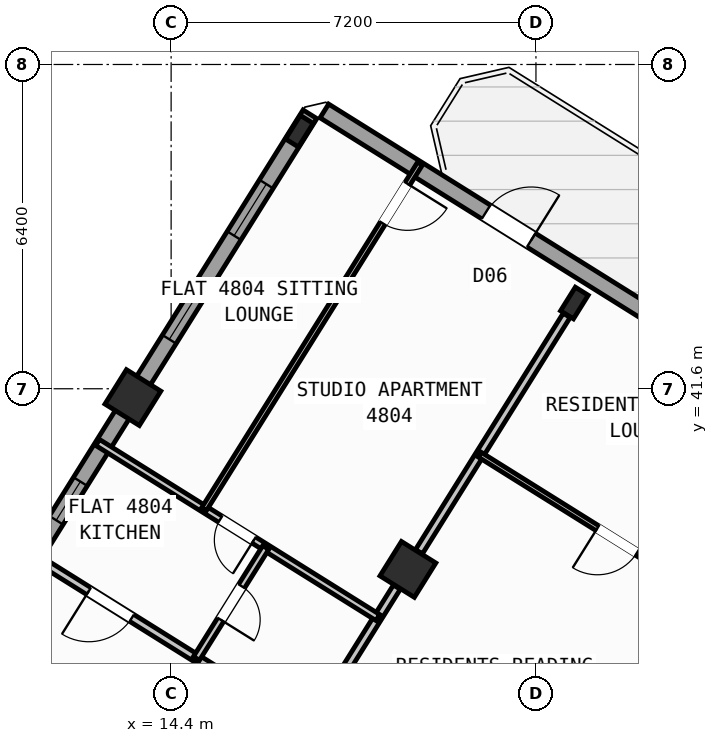
"""IFC4 building model, lengths in metres.
Left out: names, types, materials, properties, quantities, classifications, styles, units other than length and angle.
Written with IfcOpenShell. Run it as: python <this file> out.ifc"""

import sys

from ifc_helpers import new_model, si_unit, direction, frame, frame_2d, origin, origin_2d, place, context, subcontext, project, spatial, rectangle, hollow_rectangle, i_section, extrude, source, transform, mapped, element, fill, save


model = new_model("IFC4")
c1 = context("Model", 3, precision=1e-05, world=origin(), true_north=direction((0.0, 1.0)))
c2 = subcontext(c1, "Body", "Model", "MODEL_VIEW")
j1 = project(units=[si_unit("LENGTHUNIT", "METRE"), si_unit("PLANEANGLEUNIT", "RADIAN")], contexts=[c1])
p1 = place(None, origin())
s1 = spatial("IfcSite", under=j1, at=p1, CompositionType="ELEMENT")
p2 = place(p1, origin())
s2 = spatial("IfcBuilding", under=s1, at=p2, CompositionType="ELEMENT")
p3 = place(p2, frame((0.0, 0.0, 191.4)))
s3 = spatial("IfcBuildingStorey", under=s2, at=p3, CompositionType="ELEMENT", Elevation=191.4)
m1 = source(origin(), c2, "Body", "SweptSolid", [
    extrude(i_section(OverallWidth=0.3, OverallDepth=0.55, WebThickness=0.015, FlangeThickness=0.029, at=origin_2d()), origin(), (0.0, 0.0, 1.0), 3.6),
])
p4 = place(p3, frame((22.358, 43.292, 0.0), z_axis=(0.0, 0.0, 1.0), x_axis=(-0.848048096156, 0.529919264233, 0.0)))
e1 = element("IfcColumn", 1, at=p4, inside=s3, PredefinedType="COLUMN", context=c2, shape_type="MappedRepresentation", body=[
    mapped(m1, transform((0.0, 0.0, 0.0), scale=1.0)),
])
m2 = source(origin(), c2, "Body", "SweptSolid", [
    extrude(hollow_rectangle(XDim=0.8, YDim=0.8, WallThickness=0.032, at=origin_2d()), origin(), (0.0, 0.0, 1.0), 3.6),
])
p5 = place(p3, frame((19.073, 38.034, 0.0), z_axis=(0.0, 0.0, 1.0), x_axis=(-0.848048096156, 0.529919264233, 0.0)))
e2 = element("IfcColumn", 2, at=p5, inside=s3, PredefinedType="COLUMN", context=c2, shape_type="MappedRepresentation", body=[
    mapped(m2, transform((0.0, 0.0, 0.0), scale=1.0)),
])
p6 = place(p3, frame((16.931, 46.684, 0.0), z_axis=(0.0, 0.0, 1.0), x_axis=(-0.848048096156, 0.529919264233, 0.0)))
e3 = element("IfcColumn", 3, at=p6, inside=s3, PredefinedType="COLUMN", context=c2, shape_type="MappedRepresentation", body=[
    mapped(m1, transform((0.0, 0.0, 0.0), scale=1.0)),
])
p7 = place(p3, frame((13.646, 41.426, 0.0), z_axis=(0.0, 0.0, 1.0), x_axis=(-0.848048096156, 0.529919264233, 0.0)))
e4 = element("IfcColumn", 4, at=p7, inside=s3, PredefinedType="COLUMN", context=c2, shape_type="MappedRepresentation", body=[
    mapped(m2, transform((0.0, 0.0, 0.0), scale=1.0)),
])
p8 = place(p3, frame((5.7, 28.71, 0.0), z_axis=(0.0, 0.0, 1.0), x_axis=(0.529923711467, 0.8480453172, 0.0)))
e5 = element("IfcWall", 5, at=p8, inside=s3, PredefinedType="STANDARD", context=c2, shape_type="SweptSolid", body=[
    extrude(rectangle(XDim=21.587, YDim=0.32, at=frame_2d((10.794, 0.0))), origin(), (0.0, 0.0, 1.0), 2.795),
])
p9 = place(p8, frame((1.44, 0.0, 0.95)))
e6 = element("IfcOpeningElement", 6, at=p9, cuts=e5, PredefinedType="OPENING", context=c2, shape_type="SweptSolid", body=[
    extrude(rectangle(XDim=1.2, YDim=1.4, at=frame_2d((0.6, 0.7))), frame((0.0, 0.17, 0.0), z_axis=(0.0, -1.0, 0.0), x_axis=(1.0, 0.0, 0.0)), (0.0, 0.0, 1.0), 0.34),
])
p10 = place(p8, frame((4.545, 0.0, 0.85)))
e7 = element("IfcOpeningElement", 7, at=p10, cuts=e5, PredefinedType="OPENING", context=c2, shape_type="SweptSolid", body=[
    extrude(rectangle(XDim=1.8, YDim=1.5, at=frame_2d((0.9, 0.75))), frame((0.0, 0.17, 0.0), z_axis=(0.0, -1.0, 0.0), x_axis=(1.0, 0.0, 0.0)), (0.0, 0.0, 1.0), 0.34),
])
p11 = place(p8, frame((12.139, 0.0, 1.0)))
e8 = element("IfcOpeningElement", 8, at=p11, cuts=e5, PredefinedType="OPENING", context=c2, shape_type="SweptSolid", body=[
    extrude(rectangle(XDim=0.9, YDim=1.25, at=frame_2d((0.45, 0.625))), frame((0.0, 0.17, 0.0), z_axis=(0.0, -1.0, 0.0), x_axis=(1.0, 0.0, 0.0)), (0.0, 0.0, 1.0), 0.34),
])
p12 = place(p8, frame((16.35, 0.0, 0.95)))
e9 = element("IfcOpeningElement", 9, at=p12, cuts=e5, PredefinedType="OPENING", context=c2, shape_type="SweptSolid", body=[
    extrude(rectangle(XDim=1.2, YDim=1.4, at=frame_2d((0.6, 0.7))), frame((0.0, 0.17, 0.0), z_axis=(0.0, -1.0, 0.0), x_axis=(1.0, 0.0, 0.0)), (0.0, 0.0, 1.0), 0.34),
])
p13 = place(p8, frame((18.762, 0.0, 0.95)))
e10 = element("IfcOpeningElement", 10, at=p13, cuts=e5, PredefinedType="OPENING", context=c2, shape_type="SweptSolid", body=[
    extrude(rectangle(XDim=1.2, YDim=1.4, at=frame_2d((0.6, 0.7))), frame((0.0, 0.17, 0.0), z_axis=(0.0, -1.0, 0.0), x_axis=(1.0, 0.0, 0.0)), (0.0, 0.0, 1.0), 0.34),
])
p14 = place(p3, frame((17.424, 47.083, 0.0), z_axis=(0.0, 0.0, 1.0), x_axis=(0.848049927979, -0.529916332693, 0.0)))
e11 = element("IfcWall", 11, at=p14, inside=s3, PredefinedType="STANDARD", context=c2, shape_type="SweptSolid", body=[
    extrude(rectangle(XDim=29.223, YDim=0.32, at=frame_2d((14.612, 0.0))), origin(), (0.0, 0.0, 1.0), 3.32),
])
p15 = place(p14, frame((3.764, 0.0, 0.0)))
e12 = element("IfcOpeningElement", 12, at=p15, cuts=e11, PredefinedType="OPENING", context=c2, shape_type="SweptSolid", body=[
    extrude(rectangle(XDim=1.05, YDim=2.15, at=frame_2d((0.525, 1.075))), frame((0.0, 0.17, 0.0), z_axis=(0.0, -1.0, 0.0), x_axis=(1.0, 0.0, 0.0)), (0.0, 0.0, 1.0), 0.34),
])
p16 = place(p14, frame((8.344, 0.0, 0.8)))
e13 = element("IfcOpeningElement", 13, at=p16, cuts=e11, PredefinedType="OPENING", context=c2, shape_type="SweptSolid", body=[
    extrude(rectangle(XDim=2.1, YDim=1.55, at=frame_2d((1.05, 0.775))), frame((0.0, 0.17, 0.0), z_axis=(0.0, -1.0, 0.0), x_axis=(1.0, 0.0, 0.0)), (0.0, 0.0, 1.0), 0.34),
])
p17 = place(p14, frame((13.589, 0.0, 0.85)))
e14 = element("IfcOpeningElement", 14, at=p17, cuts=e11, PredefinedType="OPENING", context=c2, shape_type="SweptSolid", body=[
    extrude(rectangle(XDim=1.8, YDim=1.5, at=frame_2d((0.9, 0.75))), frame((0.0, 0.17, 0.0), z_axis=(0.0, -1.0, 0.0), x_axis=(1.0, 0.0, 0.0)), (0.0, 0.0, 1.0), 0.34),
])
p18 = place(p14, frame((17.104, 0.0, 0.95)))
e15 = element("IfcOpeningElement", 15, at=p18, cuts=e11, PredefinedType="OPENING", context=c2, shape_type="SweptSolid", body=[
    extrude(rectangle(XDim=1.2, YDim=1.4, at=frame_2d((0.6, 0.7))), frame((0.0, 0.17, 0.0), z_axis=(0.0, -1.0, 0.0), x_axis=(1.0, 0.0, 0.0)), (0.0, 0.0, 1.0), 0.34),
])
p19 = place(p14, frame((21.214, 0.0, 0.95)))
e16 = element("IfcOpeningElement", 16, at=p19, cuts=e11, PredefinedType="OPENING", context=c2, shape_type="SweptSolid", body=[
    extrude(rectangle(XDim=1.2, YDim=1.4, at=frame_2d((0.6, 0.7))), frame((0.0, 0.17, 0.0), z_axis=(0.0, -1.0, 0.0), x_axis=(1.0, 0.0, 0.0)), (0.0, 0.0, 1.0), 0.34),
])
p20 = place(p14, frame((25.853, 0.0, 0.95)))
e17 = element("IfcOpeningElement", 17, at=p20, cuts=e11, PredefinedType="OPENING", context=c2, shape_type="SweptSolid", body=[
    extrude(rectangle(XDim=1.2, YDim=1.4, at=frame_2d((0.6, 0.7))), frame((0.0, 0.17, 0.0), z_axis=(0.0, -1.0, 0.0), x_axis=(1.0, 0.0, 0.0)), (0.0, 0.0, 1.0), 0.34),
])
p21 = place(p3, frame((25.754, 29.497, 0.0), z_axis=(0.0, 0.0, 1.0), x_axis=(-0.848045850158, 0.529922858565, 0.0)))
e18 = element("IfcWall", 18, at=p21, inside=s3, PredefinedType="PARTITIONING", context=c2, shape_type="SweptSolid", body=[
    extrude(rectangle(XDim=16.73, YDim=0.16, at=frame_2d((8.365, 0.0))), origin(), (0.0, 0.0, 1.0), 3.31),
])
p22 = place(p21, frame((2.22, 0.0, 0.0)))
e19 = element("IfcOpeningElement", 19, at=p22, cuts=e18, PredefinedType="OPENING", context=c2, shape_type="SweptSolid", body=[
    extrude(rectangle(XDim=0.86, YDim=2.05, at=frame_2d((0.43, 1.025))), frame((0.0, 0.09, 0.0), z_axis=(0.0, -1.0, 0.0), x_axis=(1.0, 0.0, 0.0)), (0.0, 0.0, 1.0), 0.18),
])
p23 = place(p21, frame((6.49, 0.0, 0.0)))
e20 = element("IfcOpeningElement", 20, at=p23, cuts=e18, PredefinedType="OPENING", context=c2, shape_type="SweptSolid", body=[
    extrude(rectangle(XDim=1.0, YDim=2.1, at=frame_2d((0.5, 1.05))), frame((0.0, 0.09, 0.0), z_axis=(0.0, -1.0, 0.0), x_axis=(1.0, 0.0, 0.0)), (0.0, 0.0, 1.0), 0.18),
])
p24 = place(p21, frame((14.304, 0.0, 0.0)))
e21 = element("IfcOpeningElement", 21, at=p24, cuts=e18, PredefinedType="OPENING", context=c2, shape_type="SweptSolid", body=[
    extrude(rectangle(XDim=1.0, YDim=2.1, at=frame_2d((0.5, 1.05))), frame((0.0, 0.09, 0.0), z_axis=(0.0, -1.0, 0.0), x_axis=(1.0, 0.0, 0.0)), (0.0, 0.0, 1.0), 0.18),
])
p25 = place(p3, frame((24.588, 27.631, 0.0), z_axis=(0.0, 0.0, 1.0), x_axis=(-0.848041752158, 0.529929416617, 0.0)))
e22 = element("IfcWall", 22, at=p25, inside=s3, PredefinedType="PARTITIONING", context=c2, shape_type="SweptSolid", body=[
    extrude(rectangle(XDim=16.73, YDim=0.16, at=frame_2d((8.365, 0.0))), origin(), (0.0, 0.0, 1.0), 3.31),
])
p26 = place(p25, frame((2.22, 0.0, 0.0)))
e23 = element("IfcOpeningElement", 23, at=p26, cuts=e22, PredefinedType="OPENING", context=c2, shape_type="SweptSolid", body=[
    extrude(rectangle(XDim=0.86, YDim=2.05, at=frame_2d((0.43, 1.025))), frame((0.0, 0.09, 0.0), z_axis=(0.0, -1.0, 0.0), x_axis=(1.0, 0.0, 0.0)), (0.0, 0.0, 1.0), 0.18),
])
p27 = place(p25, frame((7.82, 0.0, 0.0)))
e24 = element("IfcOpeningElement", 24, at=p27, cuts=e22, PredefinedType="OPENING", context=c2, shape_type="SweptSolid", body=[
    extrude(rectangle(XDim=1.0, YDim=2.1, at=frame_2d((0.5, 1.05))), frame((0.0, 0.09, 0.0), z_axis=(0.0, -1.0, 0.0), x_axis=(1.0, 0.0, 0.0)), (0.0, 0.0, 1.0), 0.18),
])
p28 = place(p25, frame((12.95, 0.0, 0.0)))
e25 = element("IfcOpeningElement", 25, at=p28, cuts=e22, PredefinedType="OPENING", context=c2, shape_type="SweptSolid", body=[
    extrude(rectangle(XDim=1.0, YDim=2.1, at=frame_2d((0.5, 1.05))), frame((0.0, 0.09, 0.0), z_axis=(0.0, -1.0, 0.0), x_axis=(1.0, 0.0, 0.0)), (0.0, 0.0, 1.0), 0.18),
])
p29 = place(p3, frame((22.206, 43.049, 0.0), z_axis=(0.0, 0.0, 1.0), x_axis=(-0.529919150083, -0.848048167486, 0.0)))
e26 = element("IfcWall", 26, at=p29, inside=s3, PredefinedType="PARTITIONING", context=c2, shape_type="SweptSolid", body=[
    extrude(rectangle(XDim=5.501, YDim=0.16, at=frame_2d((2.75, 0.0))), origin(), (0.0, 0.0, 1.0), 2.795),
])
p30 = place(p3, frame((18.854, 37.685, 0.0), z_axis=(0.0, 0.0, 1.0), x_axis=(-0.529885466561, -0.848069214349, 0.0)))
e27 = element("IfcWall", 27, at=p30, inside=s3, PredefinedType="PARTITIONING", context=c2, shape_type="SweptSolid", body=[
    extrude(rectangle(XDim=3.288, YDim=0.16, at=frame_2d((1.644, 0.0))), origin(), (0.0, 0.0, 1.0), 2.795),
])
p31 = place(p3, frame((25.916, 36.909, 0.0), z_axis=(0.0, 0.0, 1.0), x_axis=(-0.848056163074, 0.529906354247, 0.0)))
e28 = element("IfcWall", 28, at=p31, inside=s3, PredefinedType="PARTITIONING", context=c2, shape_type="SweptSolid", body=[
    extrude(rectangle(XDim=6.4, YDim=0.11, at=frame_2d((3.2, 0.0))), origin(), (0.0, 0.0, 1.0), 3.31),
])
p32 = place(p31, frame((2.74, 0.0, 0.0)))
e29 = element("IfcOpeningElement", 29, at=p32, cuts=e28, PredefinedType="OPENING", context=c2, shape_type="SweptSolid", body=[
    extrude(rectangle(XDim=0.92, YDim=2.08, at=frame_2d((0.46, 1.04))), frame((0.0, 0.065, 0.0), z_axis=(0.0, -1.0, 0.0), x_axis=(1.0, 0.0, 0.0)), (0.0, 0.0, 1.0), 0.13),
])
p33 = place(p3, frame((18.479, 37.084, 0.0), z_axis=(0.0, 0.0, 1.0), x_axis=(-0.848048787466, 0.529918157905, 0.0)))
e30 = element("IfcWall", 30, at=p33, inside=s3, PredefinedType="PLUMBINGWALL", context=c2, shape_type="SweptSolid", body=[
    extrude(rectangle(XDim=6.52, YDim=0.14, at=frame_2d((3.26, 0.0))), origin(), (0.0, 0.0, 1.0), 3.31),
])
p34 = place(p33, frame((2.885, 0.0, 0.0)))
e31 = element("IfcOpeningElement", 31, at=p34, cuts=e30, PredefinedType="OPENING", context=c2, shape_type="SweptSolid", body=[
    extrude(rectangle(XDim=0.78, YDim=2.05, at=frame_2d((0.39, 1.025))), frame((0.0, 0.08, 0.0), z_axis=(0.0, -1.0, 0.0), x_axis=(1.0, 0.0, 0.0)), (0.0, 0.0, 1.0), 0.16),
])
p35 = place(p3, frame((16.268, 38.467, 0.0), z_axis=(0.0, 0.0, 1.0), x_axis=(-0.529913878929, -0.848051461244, 0.0)))
e32 = element("IfcWall", 32, at=p35, inside=s3, PredefinedType="PLUMBINGWALL", context=c2, shape_type="SweptSolid", body=[
    extrude(rectangle(XDim=2.58, YDim=0.14, at=frame_2d((1.29, 0.0))), origin(), (0.0, 0.0, 1.0), 3.31),
])
p36 = place(p35, frame((0.9, 0.0, 0.0)))
e33 = element("IfcOpeningElement", 33, at=p36, cuts=e32, PredefinedType="OPENING", context=c2, shape_type="SweptSolid", body=[
    extrude(rectangle(XDim=0.78, YDim=2.05, at=frame_2d((0.39, 1.025))), frame((0.0, 0.08, 0.0), z_axis=(0.0, -1.0, 0.0), x_axis=(1.0, 0.0, 0.0)), (0.0, 0.0, 1.0), 0.16),
])
p37 = place(p3, frame((19.312, 46.045, 0.0), z_axis=(0.0, 0.0, 1.0), x_axis=(-0.529933431478, -0.848039243315, 0.0)))
e34 = element("IfcWall", 34, at=p37, inside=s3, PredefinedType="PARTITIONING", context=c2, shape_type="SweptSolid", body=[
    extrude(rectangle(XDim=8.04, YDim=0.11, at=frame_2d((4.02, 0.0))), origin(), (0.0, 0.0, 1.0), 2.935),
])
p38 = place(p37, frame((0.47, 0.0, 0.0)))
e35 = element("IfcOpeningElement", 35, at=p38, cuts=e34, PredefinedType="OPENING", context=c2, shape_type="SweptSolid", body=[
    extrude(rectangle(XDim=0.92, YDim=2.08, at=frame_2d((0.46, 1.04))), frame((0.0, 0.065, 0.0), z_axis=(0.0, -1.0, 0.0), x_axis=(1.0, 0.0, 0.0)), (0.0, 0.0, 1.0), 0.13),
])
m3 = source(origin(), c2, "Body", "SweptSolid", [
    extrude(rectangle(XDim=1.05, YDim=2.15, at=frame_2d((0.525, 1.075))), frame((0.0, 0.025, 0.0), z_axis=(0.0, -1.0, 0.0), x_axis=(1.0, 0.0, 0.0)), (0.0, 0.0, 1.0), 0.05),
])
p39 = place(p15, origin())
e36 = element("IfcDoor", 36, at=p39, inside=s3, OperationType="SINGLE_SWING_RIGHT", PredefinedType="DOOR", context=c2, shape_type="MappedRepresentation", body=[
    mapped(m3, transform((0.0, 0.0, 0.0), scale=1.0)),
])
fill(e12, e36)
m4 = source(origin(), c2, "Body", "SweptSolid", [
    extrude(rectangle(XDim=0.9, YDim=1.25, at=frame_2d((0.45, 0.625))), frame((0.0, 0.03, 0.0), z_axis=(0.0, -1.0, 0.0), x_axis=(1.0, 0.0, 0.0)), (0.0, 0.0, 1.0), 0.06),
])
p40 = place(p11, origin())
e37 = element("IfcWindow", 37, at=p40, inside=s3, PartitioningType="SINGLE_PANEL", PredefinedType="WINDOW", context=c2, shape_type="MappedRepresentation", body=[
    mapped(m4, transform((0.0, 0.0, 0.0), scale=1.0)),
])
fill(e8, e37)
m5 = source(origin(), c2, "Body", "SweptSolid", [
    extrude(rectangle(XDim=1.2, YDim=1.4, at=frame_2d((0.6, 0.7))), frame((0.0, 0.03, 0.0), z_axis=(0.0, -1.0, 0.0), x_axis=(1.0, 0.0, 0.0)), (0.0, 0.0, 1.0), 0.06),
])
p41 = place(p12, origin())
e38 = element("IfcWindow", 38, at=p41, inside=s3, PartitioningType="SINGLE_PANEL", PredefinedType="WINDOW", context=c2, shape_type="MappedRepresentation", body=[
    mapped(m5, transform((0.0, 0.0, 0.0), scale=1.0)),
])
fill(e9, e38)
p42 = place(p13, origin())
e39 = element("IfcWindow", 39, at=p42, inside=s3, PartitioningType="SINGLE_PANEL", PredefinedType="WINDOW", context=c2, shape_type="MappedRepresentation", body=[
    mapped(m5, transform((0.0, 0.0, 0.0), scale=1.0)),
])
fill(e10, e39)
m6 = source(origin(), c2, "Body", "SweptSolid", [
    extrude(rectangle(XDim=0.92, YDim=2.08, at=frame_2d((0.46, 1.04))), frame((0.0, 0.025, 0.0), z_axis=(0.0, -1.0, 0.0), x_axis=(1.0, 0.0, 0.0)), (0.0, 0.0, 1.0), 0.05),
])
p43 = place(p32, origin())
e40 = element("IfcDoor", 40, at=p43, inside=s3, OperationType="SINGLE_SWING_RIGHT", PredefinedType="DOOR", context=c2, shape_type="MappedRepresentation", body=[
    mapped(m6, transform((0.0, 0.0, 0.0), scale=1.0)),
])
fill(e29, e40)
p44 = place(p38, origin())
e41 = element("IfcDoor", 41, at=p44, inside=s3, OperationType="SINGLE_SWING_LEFT", PredefinedType="DOOR", context=c2, shape_type="MappedRepresentation", body=[
    mapped(m6, transform((0.0, 0.0, 0.0), scale=1.0)),
])
fill(e35, e41)
m7 = source(origin(), c2, "Body", "SweptSolid", [
    extrude(rectangle(XDim=1.0, YDim=2.1, at=frame_2d((0.5, 1.05))), frame((0.0, 0.025, 0.0), z_axis=(0.0, -1.0, 0.0), x_axis=(1.0, 0.0, 0.0)), (0.0, 0.0, 1.0), 0.05),
])
p45 = place(p24, origin())
e42 = element("IfcDoor", 42, at=p45, inside=s3, OperationType="SINGLE_SWING_RIGHT", PredefinedType="DOOR", context=c2, shape_type="MappedRepresentation", body=[
    mapped(m7, transform((0.0, 0.0, 0.0), scale=1.0)),
])
fill(e21, e42)
m8 = source(origin(), c2, "Body", "SweptSolid", [
    extrude(rectangle(XDim=0.78, YDim=2.05, at=frame_2d((0.39, 1.025))), frame((0.0, 0.025, 0.0), z_axis=(0.0, -1.0, 0.0), x_axis=(1.0, 0.0, 0.0)), (0.0, 0.0, 1.0), 0.05),
])
p46 = place(p34, origin())
e43 = element("IfcDoor", 43, at=p46, inside=s3, OperationType="SINGLE_SWING_LEFT", PredefinedType="DOOR", context=c2, shape_type="MappedRepresentation", body=[
    mapped(m8, transform((0.0, 0.0, 0.0), scale=1.0)),
])
fill(e31, e43)
p47 = place(p36, origin())
e44 = element("IfcDoor", 44, at=p47, inside=s3, OperationType="SINGLE_SWING_RIGHT", PredefinedType="DOOR", context=c2, shape_type="MappedRepresentation", body=[
    mapped(m8, transform((0.0, 0.0, 0.0), scale=1.0)),
])
fill(e33, e44)
save(model, sys.argv[1])
